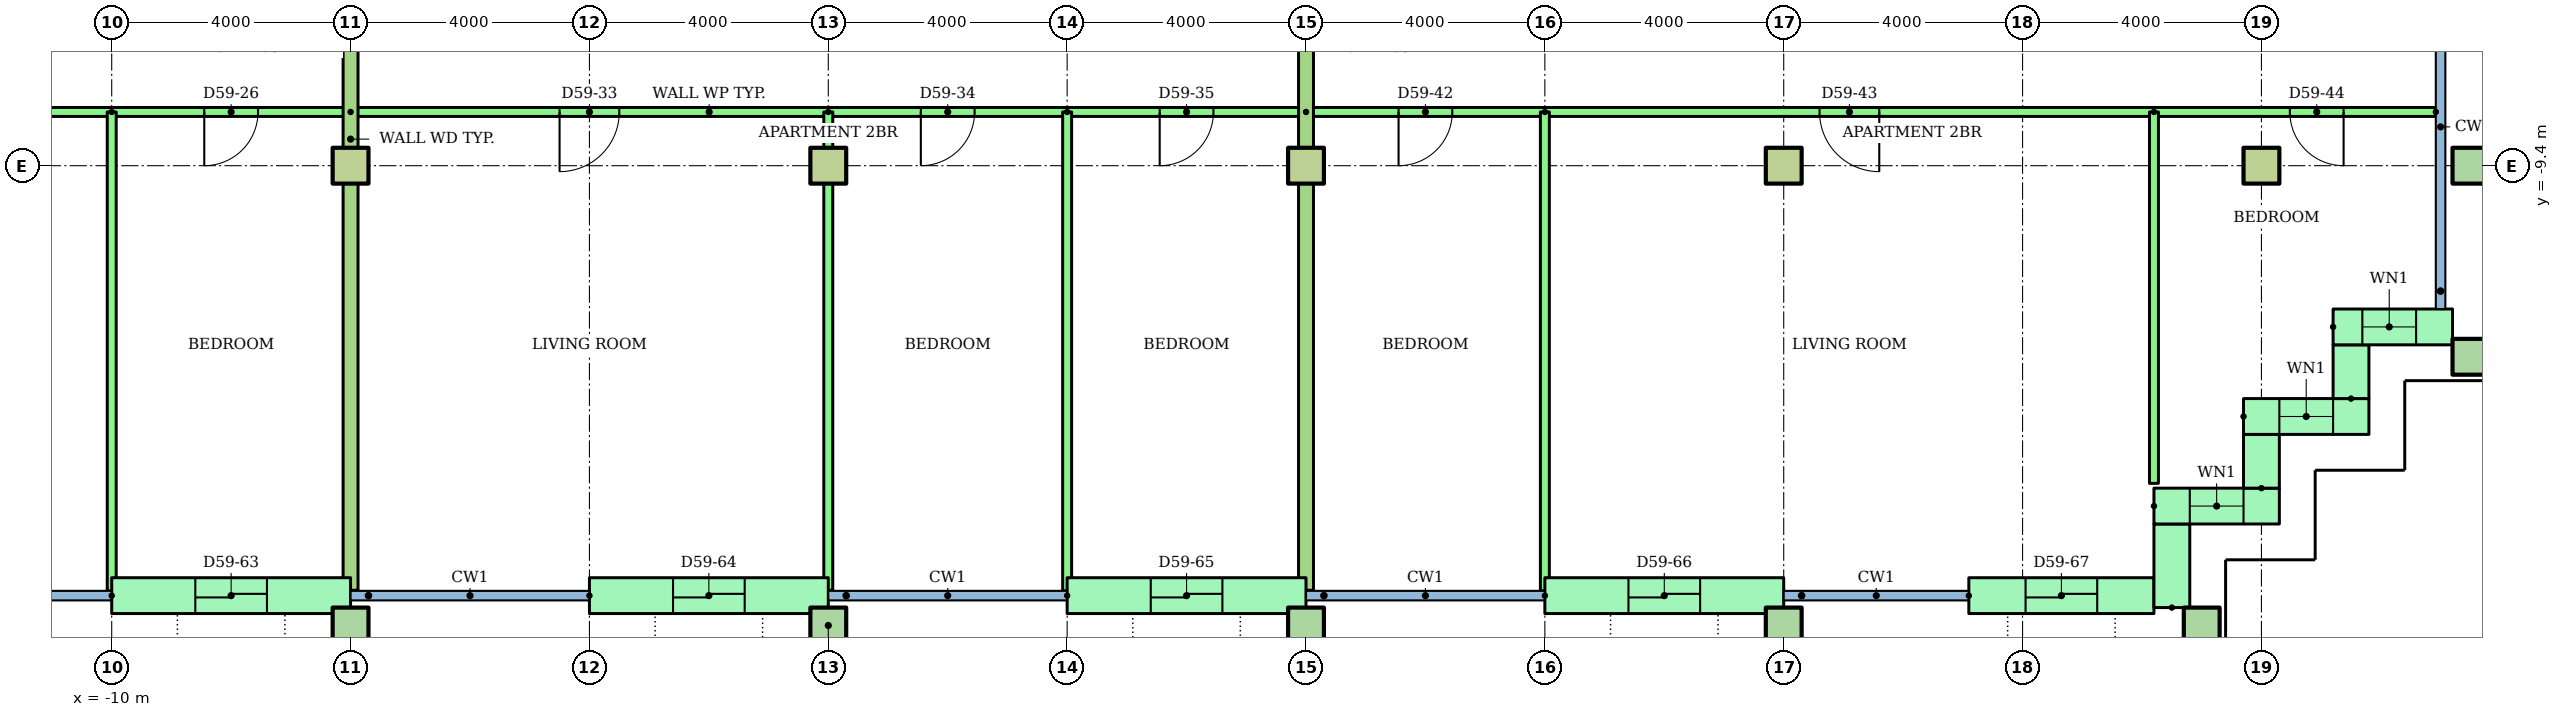
"""IFC4 building model, lengths in metres.
Left out: names, types, materials, properties, quantities, classifications, styles, units other than length and angle.
Written with IfcOpenShell. Run it as: python <this file> out.ifc"""

import sys

from ifc_helpers import new_model, si_unit, direction, frame, frame_2d, origin, origin_2d, place, context, subcontext, project, spatial, rectangle, hollow_rectangle, extrude, element, fill, save


model = new_model("IFC4")
c1 = context("Model", 3, precision=1e-05, world=origin(), true_north=direction((0.0, 1.0)))
c2 = subcontext(c1, "Body", "Model", "MODEL_VIEW")
j1 = project(units=[si_unit("LENGTHUNIT", "METRE"), si_unit("PLANEANGLEUNIT", "RADIAN")], contexts=[c1])
p1 = place(None, origin())
s1 = spatial("IfcSite", under=j1, at=p1, CompositionType="ELEMENT")
p2 = place(p1, origin())
s2 = spatial("IfcBuilding", under=s1, at=p2, CompositionType="ELEMENT")
p3 = place(p2, frame((0.0, 0.0, 226.8)))
s3 = spatial("IfcBuildingStorey", under=s2, at=p3, CompositionType="ELEMENT", Elevation=226.8)
for number, where in (
    (1, (-6.0, -17.1, 0.0)),
    (2, (2.0, -17.1, 0.0)),
    (3, (10.0, -17.1, 0.0)),
    (4, (18.0, -17.1, 0.0)),
    (5, (25.0, -17.1, 0.0)),
    (6, (29.5, -12.6, 0.0)),
):
    element("IfcColumn", number, at=place(p3, frame(where)), inside=s3, PredefinedType="COLUMN", context=c2, shape_type="SweptSolid", body=[
        extrude(hollow_rectangle(XDim=0.6, YDim=0.6, WallThickness=0.03, at=origin_2d()), origin(), (0.0, 0.0, 1.0), 3.2),
    ])
for number, where in (
    (7, (-6.0, -9.4, 0.0)),
    (8, (2.0, -9.4, 0.0)),
    (9, (10.0, -9.4, 0.0)),
    (10, (18.0, -9.4, 0.0)),
    (11, (26.0, -9.4, 0.0)),
):
    element("IfcColumn", number, at=place(p3, frame(where)), inside=s3, PredefinedType="COLUMN", context=c2, shape_type="SweptSolid", body=[
        extrude(rectangle(XDim=0.6, YDim=0.6, at=origin_2d()), origin(), (0.0, 0.0, 1.0), 3.2),
    ])
p4 = place(p3, frame((29.5, -9.4, 0.0)))
e12 = element("IfcColumn", 12, at=p4, inside=s3, PredefinedType="COLUMN", context=c2, shape_type="SweptSolid", body=[
    extrude(hollow_rectangle(XDim=0.6, YDim=0.6, WallThickness=0.03, at=origin_2d()), origin(), (0.0, 0.0, 1.0), 3.2),
])
p5 = place(p3, frame((-10.0, -16.6, 0.0)))
e13 = element("IfcWall", 13, at=p5, inside=s3, PredefinedType="STANDARD", context=c2, shape_type="SweptSolid", body=[
    extrude(rectangle(XDim=4.0, YDim=0.6, at=frame_2d((2.0, 0.0))), origin(), (0.0, 0.0, 1.0), 2.92),
])
p6 = place(p5, frame((1.4, 0.0, 0.0)))
e14 = element("IfcOpeningElement", 14, at=p6, cuts=e13, PredefinedType="OPENING", context=c2, shape_type="SweptSolid", body=[
    extrude(rectangle(XDim=1.2, YDim=2.1, at=frame_2d((0.6, 1.05))), frame((0.0, 0.31, 0.0), z_axis=(0.0, -1.0, 0.0), x_axis=(1.0, 0.0, 0.0)), (0.0, 0.0, 1.0), 0.62),
])
p7 = place(p3, frame((-2.0, -16.6, 0.0)))
e15 = element("IfcWall", 15, at=p7, inside=s3, PredefinedType="STANDARD", context=c2, shape_type="SweptSolid", body=[
    extrude(rectangle(XDim=4.0, YDim=0.6, at=frame_2d((2.0, 0.0))), origin(), (0.0, 0.0, 1.0), 2.92),
])
p8 = place(p7, frame((1.4, 0.0, 0.0)))
e16 = element("IfcOpeningElement", 16, at=p8, cuts=e15, PredefinedType="OPENING", context=c2, shape_type="SweptSolid", body=[
    extrude(rectangle(XDim=1.2, YDim=2.1, at=frame_2d((0.6, 1.05))), frame((0.0, 0.31, 0.0), z_axis=(0.0, -1.0, 0.0), x_axis=(1.0, 0.0, 0.0)), (0.0, 0.0, 1.0), 0.62),
])
p9 = place(p3, frame((6.0, -16.6, 0.0)))
e17 = element("IfcWall", 17, at=p9, inside=s3, PredefinedType="STANDARD", context=c2, shape_type="SweptSolid", body=[
    extrude(rectangle(XDim=4.0, YDim=0.6, at=frame_2d((2.0, 0.0))), origin(), (0.0, 0.0, 1.0), 2.92),
])
p10 = place(p9, frame((1.4, 0.0, 0.0)))
e18 = element("IfcOpeningElement", 18, at=p10, cuts=e17, PredefinedType="OPENING", context=c2, shape_type="SweptSolid", body=[
    extrude(rectangle(XDim=1.2, YDim=2.1, at=frame_2d((0.6, 1.05))), frame((0.0, 0.31, 0.0), z_axis=(0.0, -1.0, 0.0), x_axis=(1.0, 0.0, 0.0)), (0.0, 0.0, 1.0), 0.62),
])
p11 = place(p3, frame((14.0, -16.6, 0.0)))
e19 = element("IfcWall", 19, at=p11, inside=s3, PredefinedType="STANDARD", context=c2, shape_type="SweptSolid", body=[
    extrude(rectangle(XDim=4.0, YDim=0.6, at=frame_2d((2.0, 0.0))), origin(), (0.0, 0.0, 1.0), 2.92),
])
p12 = place(p11, frame((1.4, 0.0, 0.0)))
e20 = element("IfcOpeningElement", 20, at=p12, cuts=e19, PredefinedType="OPENING", context=c2, shape_type="SweptSolid", body=[
    extrude(rectangle(XDim=1.2, YDim=2.1, at=frame_2d((0.6, 1.05))), frame((0.0, 0.31, 0.0), z_axis=(0.0, -1.0, 0.0), x_axis=(1.0, 0.0, 0.0)), (0.0, 0.0, 1.0), 0.62),
])
p13 = place(p3, frame((21.1, -16.6, 0.0)))
e21 = element("IfcWall", 21, at=p13, inside=s3, PredefinedType="STANDARD", context=c2, shape_type="SweptSolid", body=[
    extrude(rectangle(XDim=3.1, YDim=0.6, at=frame_2d((1.55, 0.0))), origin(), (0.0, 0.0, 1.0), 2.92),
])
p14 = place(p13, frame((0.95, 0.0, 0.0)))
e22 = element("IfcOpeningElement", 22, at=p14, cuts=e21, PredefinedType="OPENING", context=c2, shape_type="SweptSolid", body=[
    extrude(rectangle(XDim=1.2, YDim=2.1, at=frame_2d((0.6, 1.05))), frame((0.0, 0.31, 0.0), z_axis=(0.0, -1.0, 0.0), x_axis=(1.0, 0.0, 0.0)), (0.0, 0.0, 1.0), 0.62),
])
p15 = place(p3, frame((24.5, -16.8, 0.0), z_axis=(0.0, 0.0, 1.0), x_axis=(0.0, 1.0, 0.0)))
e23 = element("IfcWall", 23, at=p15, inside=s3, PredefinedType="STANDARD", context=c2, shape_type="SweptSolid", body=[
    extrude(rectangle(XDim=1.4, YDim=0.6, at=frame_2d((0.7, 0.0))), origin(), (0.0, 0.0, 1.0), 2.92),
])
p16 = place(p3, frame((24.2, -15.1, 0.0)))
e24 = element("IfcWall", 24, at=p16, inside=s3, PredefinedType="STANDARD", context=c2, shape_type="SweptSolid", body=[
    extrude(rectangle(XDim=2.1, YDim=0.6, at=frame_2d((1.05, 0.0))), origin(), (0.0, 0.0, 1.0), 2.92),
])
p17 = place(p16, frame((0.6, 0.0, 0.9)))
e25 = element("IfcOpeningElement", 25, at=p17, cuts=e24, PredefinedType="OPENING", context=c2, shape_type="SweptSolid", body=[
    extrude(rectangle(XDim=0.9, YDim=1.5, at=frame_2d((0.45, 0.75))), frame((0.0, 0.31, 0.0), z_axis=(0.0, -1.0, 0.0), x_axis=(1.0, 0.0, 0.0)), (0.0, 0.0, 1.0), 0.62),
])
p18 = place(p3, frame((26.0, -14.8, 0.0), z_axis=(0.0, 0.0, 1.0), x_axis=(0.0, 1.0, 0.0)))
e26 = element("IfcWall", 26, at=p18, inside=s3, PredefinedType="STANDARD", context=c2, shape_type="SweptSolid", body=[
    extrude(rectangle(XDim=0.9, YDim=0.6, at=frame_2d((0.45, 0.0))), origin(), (0.0, 0.0, 1.0), 2.92),
])
p19 = place(p3, frame((25.7, -13.6, 0.0)))
e27 = element("IfcWall", 27, at=p19, inside=s3, PredefinedType="STANDARD", context=c2, shape_type="SweptSolid", body=[
    extrude(rectangle(XDim=2.1, YDim=0.6, at=frame_2d((1.05, 0.0))), origin(), (0.0, 0.0, 1.0), 2.92),
])
p20 = place(p19, frame((0.6, 0.0, 0.9)))
e28 = element("IfcOpeningElement", 28, at=p20, cuts=e27, PredefinedType="OPENING", context=c2, shape_type="SweptSolid", body=[
    extrude(rectangle(XDim=0.9, YDim=1.5, at=frame_2d((0.45, 0.75))), frame((0.0, 0.31, 0.0), z_axis=(0.0, -1.0, 0.0), x_axis=(1.0, 0.0, 0.0)), (0.0, 0.0, 1.0), 0.62),
])
p21 = place(p3, frame((27.5, -13.3, 0.0), z_axis=(0.0, 0.0, 1.0), x_axis=(0.0, 1.0, 0.0)))
e29 = element("IfcWall", 29, at=p21, inside=s3, PredefinedType="STANDARD", context=c2, shape_type="SweptSolid", body=[
    extrude(rectangle(XDim=0.9, YDim=0.6, at=frame_2d((0.45, 0.0))), origin(), (0.0, 0.0, 1.0), 2.92),
])
p22 = place(p3, frame((27.2, -12.1, 0.0)))
e30 = element("IfcWall", 30, at=p22, inside=s3, PredefinedType="STANDARD", context=c2, shape_type="SweptSolid", body=[
    extrude(rectangle(XDim=2.0, YDim=0.6, at=frame_2d((1.0, 0.0))), origin(), (0.0, 0.0, 1.0), 2.92),
])
p23 = place(p22, frame((0.49, 0.0, 0.9)))
e31 = element("IfcOpeningElement", 31, at=p23, cuts=e30, PredefinedType="OPENING", context=c2, shape_type="SweptSolid", body=[
    extrude(rectangle(XDim=0.9, YDim=1.5, at=frame_2d((0.45, 0.75))), frame((0.0, 0.31, 0.0), z_axis=(0.0, -1.0, 0.0), x_axis=(1.0, 0.0, 0.0)), (0.0, 0.0, 1.0), 0.62),
])
p24 = place(p3, frame((-6.0, -8.5, 0.0), z_axis=(0.0, 0.0, 1.0), x_axis=(-1.0, 0.0, 0.0)))
e32 = element("IfcWall", 32, at=p24, inside=s3, PredefinedType="PARTITIONING", context=c2, shape_type="SweptSolid", body=[
    extrude(rectangle(XDim=22.91, YDim=0.15, at=frame_2d((11.455, 0.0))), origin(), (0.0, 0.0, 1.0), 2.4),
])
p25 = place(p24, frame((20.0, 0.0, 0.0)))
e33 = element("IfcOpeningElement", 33, at=p25, cuts=e32, PredefinedType="OPENING", context=c2, shape_type="SweptSolid", body=[
    extrude(rectangle(XDim=0.9, YDim=2.1, at=frame_2d((0.45, 1.05))), frame((0.0, 0.085, 0.0), z_axis=(0.0, -1.0, 0.0), x_axis=(1.0, 0.0, 0.0)), (0.0, 0.0, 1.0), 0.17),
])
p26 = place(p24, frame((12.6, 0.0, 0.0)))
e34 = element("IfcOpeningElement", 34, at=p26, cuts=e32, PredefinedType="OPENING", context=c2, shape_type="SweptSolid", body=[
    extrude(rectangle(XDim=1.0, YDim=2.1, at=frame_2d((0.5, 1.05))), frame((0.0, 0.085, 0.0), z_axis=(0.0, -1.0, 0.0), x_axis=(1.0, 0.0, 0.0)), (0.0, 0.0, 1.0), 0.17),
])
p27 = place(p24, frame((5.55, 0.0, 0.0)))
e35 = element("IfcOpeningElement", 35, at=p27, cuts=e32, PredefinedType="OPENING", context=c2, shape_type="SweptSolid", body=[
    extrude(rectangle(XDim=0.9, YDim=2.1, at=frame_2d((0.45, 1.05))), frame((0.0, 0.085, 0.0), z_axis=(0.0, -1.0, 0.0), x_axis=(1.0, 0.0, 0.0)), (0.0, 0.0, 1.0), 0.17),
])
p28 = place(p24, frame((1.55, 0.0, 0.0)))
e36 = element("IfcOpeningElement", 36, at=p28, cuts=e32, PredefinedType="OPENING", context=c2, shape_type="SweptSolid", body=[
    extrude(rectangle(XDim=0.9, YDim=2.1, at=frame_2d((0.45, 1.05))), frame((0.0, 0.085, 0.0), z_axis=(0.0, -1.0, 0.0), x_axis=(1.0, 0.0, 0.0)), (0.0, 0.0, 1.0), 0.17),
])
p29 = place(p3, frame((-10.0, -8.5, 0.0), z_axis=(0.0, 0.0, 1.0), x_axis=(0.0, -1.0, 0.0)))
e37 = element("IfcWall", 37, at=p29, inside=s3, PredefinedType="PARTITIONING", context=c2, shape_type="SweptSolid", body=[
    extrude(rectangle(XDim=8.021, YDim=0.15, at=frame_2d((4.01, 0.0))), origin(), (0.0, 0.0, 1.0), 2.4),
])
p30 = place(p3, frame((10.0, -8.5, 0.0), z_axis=(0.0, 0.0, 1.0), x_axis=(-1.0, 0.0, 0.0)))
e38 = element("IfcWall", 38, at=p30, inside=s3, PredefinedType="PARTITIONING", context=c2, shape_type="SweptSolid", body=[
    extrude(rectangle(XDim=16.0, YDim=0.15, at=frame_2d((8.0, 0.0))), origin(), (0.0, 0.0, 1.0), 2.4),
])
p31 = place(p30, frame((11.5, 0.0, 0.0)))
e39 = element("IfcOpeningElement", 39, at=p31, cuts=e38, PredefinedType="OPENING", context=c2, shape_type="SweptSolid", body=[
    extrude(rectangle(XDim=1.0, YDim=2.1, at=frame_2d((0.5, 1.05))), frame((0.0, 0.085, 0.0), z_axis=(0.0, -1.0, 0.0), x_axis=(1.0, 0.0, 0.0)), (0.0, 0.0, 1.0), 0.17),
])
p32 = place(p30, frame((5.55, 0.0, 0.0)))
e40 = element("IfcOpeningElement", 40, at=p32, cuts=e38, PredefinedType="OPENING", context=c2, shape_type="SweptSolid", body=[
    extrude(rectangle(XDim=0.9, YDim=2.1, at=frame_2d((0.45, 1.05))), frame((0.0, 0.085, 0.0), z_axis=(0.0, -1.0, 0.0), x_axis=(1.0, 0.0, 0.0)), (0.0, 0.0, 1.0), 0.17),
])
p33 = place(p30, frame((1.55, 0.0, 0.0)))
e41 = element("IfcOpeningElement", 41, at=p33, cuts=e38, PredefinedType="OPENING", context=c2, shape_type="SweptSolid", body=[
    extrude(rectangle(XDim=0.9, YDim=2.1, at=frame_2d((0.45, 1.05))), frame((0.0, 0.085, 0.0), z_axis=(0.0, -1.0, 0.0), x_axis=(1.0, 0.0, 0.0)), (0.0, 0.0, 1.0), 0.17),
])
p34 = place(p3, frame((2.0, -8.5, 0.0), z_axis=(0.0, 0.0, 1.0), x_axis=(0.0, -1.0, 0.0)))
e42 = element("IfcWall", 42, at=p34, inside=s3, PredefinedType="PARTITIONING", context=c2, shape_type="SweptSolid", body=[
    extrude(rectangle(XDim=8.01, YDim=0.15, at=frame_2d((4.005, 0.0))), origin(), (0.0, 0.0, 1.0), 2.4),
])
p35 = place(p3, frame((6.0, -8.5, 0.0), z_axis=(0.0, 0.0, 1.0), x_axis=(0.0, -1.0, 0.0)))
e43 = element("IfcWall", 43, at=p35, inside=s3, PredefinedType="PARTITIONING", context=c2, shape_type="SweptSolid", body=[
    extrude(rectangle(XDim=8.021, YDim=0.15, at=frame_2d((4.01, 0.0))), origin(), (0.0, 0.0, 1.0), 2.4),
])
p36 = place(p3, frame((-6.0, -1.4, 0.0), z_axis=(0.0, 0.0, 1.0), x_axis=(0.0, -1.0, 0.0)))
e44 = element("IfcWall", 44, at=p36, inside=s3, PredefinedType="PARTITIONING", context=c2, shape_type="SweptSolid", body=[
    extrude(rectangle(XDim=15.11, YDim=0.25, at=frame_2d((7.555, 0.0))), origin(), (0.0, 0.0, 1.0), 2.4),
])
p37 = place(p3, frame((28.92, -8.5, 0.0), z_axis=(0.0, 0.0, 1.0), x_axis=(-1.0, 0.0, 0.0)))
e45 = element("IfcWall", 45, at=p37, inside=s3, PredefinedType="PARTITIONING", context=c2, shape_type="SweptSolid", body=[
    extrude(rectangle(XDim=18.92, YDim=0.15, at=frame_2d((9.46, 0.0))), origin(), (0.0, 0.0, 1.0), 2.4),
])
p38 = place(p37, frame((16.47, 0.0, 0.0)))
e46 = element("IfcOpeningElement", 46, at=p38, cuts=e45, PredefinedType="OPENING", context=c2, shape_type="SweptSolid", body=[
    extrude(rectangle(XDim=0.9, YDim=2.1, at=frame_2d((0.45, 1.05))), frame((0.0, 0.085, 0.0), z_axis=(0.0, -1.0, 0.0), x_axis=(1.0, 0.0, 0.0)), (0.0, 0.0, 1.0), 0.17),
])
p39 = place(p37, frame((9.32, 0.0, 0.0)))
e47 = element("IfcOpeningElement", 47, at=p39, cuts=e45, PredefinedType="OPENING", context=c2, shape_type="SweptSolid", body=[
    extrude(rectangle(XDim=1.0, YDim=2.1, at=frame_2d((0.5, 1.05))), frame((0.0, 0.085, 0.0), z_axis=(0.0, -1.0, 0.0), x_axis=(1.0, 0.0, 0.0)), (0.0, 0.0, 1.0), 0.17),
])
p40 = place(p37, frame((1.544, 0.0, 0.0)))
e48 = element("IfcOpeningElement", 48, at=p40, cuts=e45, PredefinedType="OPENING", context=c2, shape_type="SweptSolid", body=[
    extrude(rectangle(XDim=0.9, YDim=2.1, at=frame_2d((0.45, 1.05))), frame((0.0, 0.085, 0.0), z_axis=(0.0, -1.0, 0.0), x_axis=(1.0, 0.0, 0.0)), (0.0, 0.0, 1.0), 0.17),
])
p41 = place(p3, frame((14.0, -8.5, 0.0), z_axis=(0.0, 0.0, 1.0), x_axis=(0.0, -1.0, 0.0)))
e49 = element("IfcWall", 49, at=p41, inside=s3, PredefinedType="PARTITIONING", context=c2, shape_type="SweptSolid", body=[
    extrude(rectangle(XDim=8.021, YDim=0.15, at=frame_2d((4.01, 0.0))), origin(), (0.0, 0.0, 1.0), 2.4),
])
p42 = place(p3, frame((24.2, -8.5, 0.0), z_axis=(0.0, 0.0, 1.0), x_axis=(0.0, -1.0, 0.0)))
e50 = element("IfcWall", 50, at=p42, inside=s3, PredefinedType="PARTITIONING", context=c2, shape_type="SweptSolid", body=[
    extrude(rectangle(XDim=6.22, YDim=0.15, at=frame_2d((3.11, 0.0))), origin(), (0.0, 0.0, 1.0), 2.4),
])
p43 = place(p3, frame((10.0, -1.4, 0.0), z_axis=(0.0, 0.0, 1.0), x_axis=(0.0, -1.0, 0.0)))
e51 = element("IfcWall", 51, at=p43, inside=s3, PredefinedType="PARTITIONING", context=c2, shape_type="SweptSolid", body=[
    extrude(rectangle(XDim=15.11, YDim=0.25, at=frame_2d((7.555, 0.0))), origin(), (0.0, 0.0, 1.0), 2.4),
])
p44 = place(p17, origin())
e52 = element("IfcWindow", 52, at=p44, inside=s3, PartitioningType="SINGLE_PANEL", PredefinedType="WINDOW", context=c2, shape_type="SweptSolid", body=[
    extrude(rectangle(XDim=0.9, YDim=1.5, at=frame_2d((0.45, 0.75))), frame((0.0, 0.03, 0.0), z_axis=(0.0, -1.0, 0.0), x_axis=(1.0, 0.0, 0.0)), (0.0, 0.0, 1.0), 0.06),
])
fill(e25, e52)
p45 = place(p20, origin())
e53 = element("IfcWindow", 53, at=p45, inside=s3, PartitioningType="SINGLE_PANEL", PredefinedType="WINDOW", context=c2, shape_type="SweptSolid", body=[
    extrude(rectangle(XDim=0.9, YDim=1.5, at=frame_2d((0.45, 0.75))), frame((0.0, 0.03, 0.0), z_axis=(0.0, -1.0, 0.0), x_axis=(1.0, 0.0, 0.0)), (0.0, 0.0, 1.0), 0.06),
])
fill(e28, e53)
p46 = place(p23, origin())
e54 = element("IfcWindow", 54, at=p46, inside=s3, PartitioningType="SINGLE_PANEL", PredefinedType="WINDOW", context=c2, shape_type="SweptSolid", body=[
    extrude(rectangle(XDim=0.9, YDim=1.5, at=frame_2d((0.45, 0.75))), frame((0.0, 0.03, 0.0), z_axis=(0.0, -1.0, 0.0), x_axis=(1.0, 0.0, 0.0)), (0.0, 0.0, 1.0), 0.06),
])
fill(e31, e54)
p47 = place(p28, origin())
e55 = element("IfcDoor", 55, at=p47, inside=s3, OperationType="SINGLE_SWING_RIGHT", PredefinedType="DOOR", context=c2, shape_type="SweptSolid", body=[
    extrude(rectangle(XDim=0.9, YDim=2.1, at=frame_2d((0.45, 1.05))), frame((0.0, 0.025, 0.0), z_axis=(0.0, -1.0, 0.0), x_axis=(1.0, 0.0, 0.0)), (0.0, 0.0, 1.0), 0.05),
])
fill(e36, e55)
p48 = place(p31, origin())
e56 = element("IfcDoor", 56, at=p48, inside=s3, OperationType="SINGLE_SWING_RIGHT", PredefinedType="DOOR", context=c2, shape_type="SweptSolid", body=[
    extrude(rectangle(XDim=1.0, YDim=2.1, at=frame_2d((0.5, 1.05))), frame((0.0, 0.025, 0.0), z_axis=(0.0, -1.0, 0.0), x_axis=(1.0, 0.0, 0.0)), (0.0, 0.0, 1.0), 0.05),
])
fill(e39, e56)
p49 = place(p32, origin())
e57 = element("IfcDoor", 57, at=p49, inside=s3, OperationType="SINGLE_SWING_RIGHT", PredefinedType="DOOR", context=c2, shape_type="SweptSolid", body=[
    extrude(rectangle(XDim=0.9, YDim=2.1, at=frame_2d((0.45, 1.05))), frame((0.0, 0.025, 0.0), z_axis=(0.0, -1.0, 0.0), x_axis=(1.0, 0.0, 0.0)), (0.0, 0.0, 1.0), 0.05),
])
fill(e40, e57)
p50 = place(p33, origin())
e58 = element("IfcDoor", 58, at=p50, inside=s3, OperationType="SINGLE_SWING_RIGHT", PredefinedType="DOOR", context=c2, shape_type="SweptSolid", body=[
    extrude(rectangle(XDim=0.9, YDim=2.1, at=frame_2d((0.45, 1.05))), frame((0.0, 0.025, 0.0), z_axis=(0.0, -1.0, 0.0), x_axis=(1.0, 0.0, 0.0)), (0.0, 0.0, 1.0), 0.05),
])
fill(e41, e58)
p51 = place(p38, origin())
e59 = element("IfcDoor", 59, at=p51, inside=s3, OperationType="SINGLE_SWING_RIGHT", PredefinedType="DOOR", context=c2, shape_type="SweptSolid", body=[
    extrude(rectangle(XDim=0.9, YDim=2.1, at=frame_2d((0.45, 1.05))), frame((0.0, 0.025, 0.0), z_axis=(0.0, -1.0, 0.0), x_axis=(1.0, 0.0, 0.0)), (0.0, 0.0, 1.0), 0.05),
])
fill(e46, e59)
p52 = place(p39, origin())
e60 = element("IfcDoor", 60, at=p52, inside=s3, OperationType="SINGLE_SWING_LEFT", PredefinedType="DOOR", context=c2, shape_type="SweptSolid", body=[
    extrude(rectangle(XDim=1.0, YDim=2.1, at=frame_2d((0.5, 1.05))), frame((0.0, 0.025, 0.0), z_axis=(0.0, -1.0, 0.0), x_axis=(1.0, 0.0, 0.0)), (0.0, 0.0, 1.0), 0.05),
])
fill(e47, e60)
p53 = place(p40, origin())
e61 = element("IfcDoor", 61, at=p53, inside=s3, OperationType="SINGLE_SWING_LEFT", PredefinedType="DOOR", context=c2, shape_type="SweptSolid", body=[
    extrude(rectangle(XDim=0.9, YDim=2.1, at=frame_2d((0.45, 1.05))), frame((0.0, 0.025, 0.0), z_axis=(0.0, -1.0, 0.0), x_axis=(1.0, 0.0, 0.0)), (0.0, 0.0, 1.0), 0.05),
])
fill(e48, e61)
p54 = place(p6, origin())
e62 = element("IfcDoor", 62, at=p54, inside=s3, OperationType="SLIDING_TO_LEFT", PredefinedType="DOOR", context=c2, shape_type="SweptSolid", body=[
    extrude(rectangle(XDim=1.2, YDim=2.1, at=frame_2d((0.6, 1.05))), frame((0.0, 0.025, 0.0), z_axis=(0.0, -1.0, 0.0), x_axis=(1.0, 0.0, 0.0)), (0.0, 0.0, 1.0), 0.05),
])
fill(e14, e62)
p55 = place(p8, origin())
e63 = element("IfcDoor", 63, at=p55, inside=s3, OperationType="SLIDING_TO_LEFT", PredefinedType="DOOR", context=c2, shape_type="SweptSolid", body=[
    extrude(rectangle(XDim=1.2, YDim=2.1, at=frame_2d((0.6, 1.05))), frame((0.0, 0.025, 0.0), z_axis=(0.0, -1.0, 0.0), x_axis=(1.0, 0.0, 0.0)), (0.0, 0.0, 1.0), 0.05),
])
fill(e16, e63)
p56 = place(p10, origin())
e64 = element("IfcDoor", 64, at=p56, inside=s3, OperationType="SLIDING_TO_LEFT", PredefinedType="DOOR", context=c2, shape_type="SweptSolid", body=[
    extrude(rectangle(XDim=1.2, YDim=2.1, at=frame_2d((0.6, 1.05))), frame((0.0, 0.025, 0.0), z_axis=(0.0, -1.0, 0.0), x_axis=(1.0, 0.0, 0.0)), (0.0, 0.0, 1.0), 0.05),
])
fill(e18, e64)
p57 = place(p12, origin())
e65 = element("IfcDoor", 65, at=p57, inside=s3, OperationType="SLIDING_TO_LEFT", PredefinedType="DOOR", context=c2, shape_type="SweptSolid", body=[
    extrude(rectangle(XDim=1.2, YDim=2.1, at=frame_2d((0.6, 1.05))), frame((0.0, 0.025, 0.0), z_axis=(0.0, -1.0, 0.0), x_axis=(1.0, 0.0, 0.0)), (0.0, 0.0, 1.0), 0.05),
])
fill(e20, e65)
p58 = place(p14, origin())
e66 = element("IfcDoor", 66, at=p58, inside=s3, OperationType="SLIDING_TO_LEFT", PredefinedType="DOOR", context=c2, shape_type="SweptSolid", body=[
    extrude(rectangle(XDim=1.2, YDim=2.1, at=frame_2d((0.6, 1.05))), frame((0.0, 0.025, 0.0), z_axis=(0.0, -1.0, 0.0), x_axis=(1.0, 0.0, 0.0)), (0.0, 0.0, 1.0), 0.05),
])
fill(e22, e66)
save(model, sys.argv[1])
